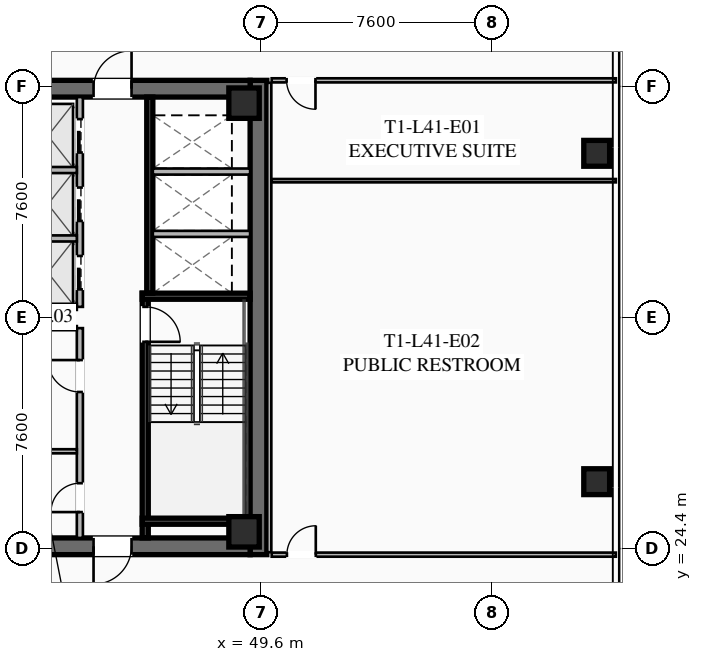
"""IFC4 building model, lengths in metres.
Left out: names, types, materials, properties, quantities, classifications, styles, units other than length and angle.
Written with IfcOpenShell. Run it as: python <this file> out.ifc"""

import sys

from ifc_helpers import new_model, si_unit, direction, frame, frame_2d, origin, origin_2d, place, context, subcontext, project, spatial, rectangle, hollow_rectangle, extrude, element, fill, save


model = new_model("IFC4")
c1 = context("Model", 3, precision=1e-05, world=origin(), true_north=direction((0.0, 1.0)))
c2 = subcontext(c1, "Body", "Model", "MODEL_VIEW")
j1 = project(units=[si_unit("LENGTHUNIT", "METRE"), si_unit("PLANEANGLEUNIT", "RADIAN")], contexts=[c1])
p1 = place(None, origin())
s1 = spatial("IfcSite", under=j1, at=p1, CompositionType="ELEMENT")
p2 = place(p1, origin())
s2 = spatial("IfcBuilding", under=s1, at=p2, CompositionType="ELEMENT")
p3 = place(p2, frame((0.0, 0.0, 153.45)))
s3 = spatial("IfcBuildingStorey", under=s2, at=p3, CompositionType="ELEMENT", Elevation=153.45)
p4 = place(p3, frame((49.525, 39.8, 0.0), z_axis=(0.0, 0.0, 1.0), x_axis=(0.0, -1.0, 0.0)))
e1 = element("IfcWall", 1, at=p4, inside=s3, PredefinedType="SHEAR", context=c2, shape_type="SweptSolid", body=[
    extrude(rectangle(XDim=15.6, YDim=0.55, at=frame_2d((7.8, 0.0))), origin(), (0.0, 0.0, 1.0), 3.55),
])
p5 = place(p3, frame((49.25, 24.475, 0.0), z_axis=(0.0, 0.0, 1.0), x_axis=(-1.0, 0.0, 0.0)))
e2 = element("IfcWall", 2, at=p5, inside=s3, PredefinedType="SHEAR", context=c2, shape_type="SweptSolid", body=[
    extrude(rectangle(XDim=14.5, YDim=0.55, at=frame_2d((7.25, 0.0))), origin(), (0.0, 0.0, 1.0), 3.55),
])
p6 = place(p5, frame((8.95, 0.0, 0.0)))
e3 = element("IfcOpeningElement", 3, at=p6, cuts=e2, PredefinedType="OPENING", context=c2, shape_type="SweptSolid", body=[
    extrude(rectangle(XDim=1.25, YDim=2.25, at=frame_2d((0.625, 1.125))), frame((0.0, 0.285, 0.0), z_axis=(0.0, -1.0, 0.0), x_axis=(1.0, 0.0, 0.0)), (0.0, 0.0, 1.0), 0.57),
])
p7 = place(p5, frame((3.9, 0.0, 0.0)))
e4 = element("IfcOpeningElement", 4, at=p7, cuts=e2, PredefinedType="OPENING", context=c2, shape_type="SweptSolid", body=[
    extrude(rectangle(XDim=1.25, YDim=2.25, at=frame_2d((0.625, 1.125))), frame((0.0, 0.285, 0.0), z_axis=(0.0, -1.0, 0.0), x_axis=(1.0, 0.0, 0.0)), (0.0, 0.0, 1.0), 0.57),
])
p8 = place(p3, frame((34.75, 39.525, 0.0), z_axis=(0.0, 0.0, 1.0), x_axis=(1.0, 0.0, 0.0)))
e5 = element("IfcWall", 5, at=p8, inside=s3, PredefinedType="SHEAR", context=c2, shape_type="SweptSolid", body=[
    extrude(rectangle(XDim=14.5, YDim=0.55, at=frame_2d((7.25, 0.0))), origin(), (0.0, 0.0, 1.0), 3.55),
])
p9 = place(p8, frame((4.3, 0.0, 0.0)))
e6 = element("IfcOpeningElement", 6, at=p9, cuts=e5, PredefinedType="OPENING", context=c2, shape_type="SweptSolid", body=[
    extrude(rectangle(XDim=1.25, YDim=2.25, at=frame_2d((0.625, 1.125))), frame((0.0, 0.285, 0.0), z_axis=(0.0, -1.0, 0.0), x_axis=(1.0, 0.0, 0.0)), (0.0, 0.0, 1.0), 0.57),
])
p10 = place(p8, frame((9.35, 0.0, 0.0)))
e7 = element("IfcOpeningElement", 7, at=p10, cuts=e5, PredefinedType="OPENING", context=c2, shape_type="SweptSolid", body=[
    extrude(rectangle(XDim=1.25, YDim=2.25, at=frame_2d((0.625, 1.125))), frame((0.0, 0.285, 0.0), z_axis=(0.0, -1.0, 0.0), x_axis=(1.0, 0.0, 0.0)), (0.0, 0.0, 1.0), 0.57),
])
for number, where, z_axis, x_axis in (
    (8, (49.05, 24.95, 0.0), (0.0, 0.0, 1.0), (1.0, 0.0, 0.0)),
    (9, (49.05, 39.05, 0.0), (0.0, 0.0, 1.0), (1.0, 0.0, 0.0)),
):
    element("IfcColumn", number, at=place(p3, frame(where, z_axis=z_axis, x_axis=x_axis)), inside=s3, PredefinedType="COLUMN", context=c2, shape_type="SweptSolid", body=[
        extrude(hollow_rectangle(XDim=1.0, YDim=1.0, WallThickness=0.04, at=origin_2d()), origin(), (0.0, 0.0, 1.0), 3.37),
    ])
for number, where, z_axis, x_axis in (
    (10, (60.65, 26.6, 0.0), (0.0, 0.0, 1.0), (1.0, 0.0, 0.0)),
    (11, (60.65, 37.4, 0.0), (0.0, 0.0, 1.0), (1.0, 0.0, 0.0)),
):
    element("IfcColumn", number, at=place(p3, frame(where, z_axis=z_axis, x_axis=x_axis)), inside=s3, PredefinedType="COLUMN", context=c2, shape_type="SweptSolid", body=[
        extrude(hollow_rectangle(XDim=0.85, YDim=0.85, WallThickness=0.035, at=origin_2d()), origin(), (0.0, 0.0, 1.0), 3.37),
    ])
p11 = place(p3, frame((45.8, 32.8, 0.0), z_axis=(0.0, 0.0, 1.0), x_axis=(0.0, -1.0, 0.0)))
e12 = element("IfcWall", 12, at=p11, inside=s3, PredefinedType="SHEAR", context=c2, shape_type="SweptSolid", body=[
    extrude(rectangle(XDim=8.05, YDim=0.2, at=frame_2d((4.025, 0.0))), origin(), (0.0, 0.0, 1.0), 3.37),
])
p12 = place(p11, frame((0.45, 0.0, 0.0)))
e13 = element("IfcOpeningElement", 13, at=p12, cuts=e12, PredefinedType="OPENING", context=c2, shape_type="SweptSolid", body=[
    extrude(rectangle(XDim=1.15, YDim=2.2, at=frame_2d((0.575, 1.1))), frame((0.0, 0.11, 0.0), z_axis=(0.0, -1.0, 0.0), x_axis=(1.0, 0.0, 0.0)), (0.0, 0.0, 1.0), 0.22),
])
for number, where, z_axis, x_axis in (
    (14, (45.7, 32.7, 0.0), (0.0, 0.0, 1.0), (1.0, 0.0, 0.0)),
    (15, (45.7, 25.3, 0.0), (0.0, 0.0, 1.0), (1.0, 0.0, 0.0)),
):
    element("IfcWall", number, at=place(p3, frame(where, z_axis=z_axis, x_axis=x_axis)), inside=s3, PredefinedType="SHEAR", context=c2, shape_type="SweptSolid", body=[
        extrude(rectangle(XDim=3.55, YDim=0.2, at=frame_2d((1.775, 0.0))), origin(), (0.0, 0.0, 1.0), 3.37),
    ])
p13 = place(p3, frame((45.95, 39.25, 0.0), z_axis=(0.0, 0.0, 1.0), x_axis=(0.0, -1.0, 0.0)))
e16 = element("IfcWall", 16, at=p13, inside=s3, PredefinedType="SHEAR", context=c2, shape_type="SweptSolid", body=[
    extrude(rectangle(XDim=6.45, YDim=0.2, at=frame_2d((3.225, 0.0))), origin(), (0.0, 0.0, 1.0), 3.37),
])
for number, where, z_axis, x_axis in (
    (17, (46.05, 34.75, 0.0), (0.0, 0.0, 1.0), (1.0, 0.0, 0.0)),
    (18, (46.05, 36.8, 0.0), (0.0, 0.0, 1.0), (1.0, 0.0, 0.0)),
):
    element("IfcWall", number, at=place(p3, frame(where, z_axis=z_axis, x_axis=x_axis)), inside=s3, PredefinedType="SOLIDWALL", context=c2, shape_type="SweptSolid", body=[
        extrude(rectangle(XDim=3.2, YDim=0.2, at=frame_2d((1.6, 0.0))), origin(), (0.0, 0.0, 1.0), 3.37),
    ])
p14 = place(p3, frame((43.65, 24.75, 0.0), z_axis=(0.0, 0.0, 1.0), x_axis=(0.0, 1.0, 0.0)))
e19 = element("IfcWall", 19, at=p14, inside=s3, PredefinedType="SOLIDWALL", context=c2, shape_type="SweptSolid", body=[
    extrude(rectangle(XDim=6.9, YDim=0.2, at=frame_2d((3.45, 0.0))), origin(), (0.0, 0.0, 1.0), 2.513),
])
p15 = place(p14, frame((0.85, 0.0, 0.0)))
e20 = element("IfcOpeningElement", 20, at=p15, cuts=e19, PredefinedType="OPENING", context=c2, shape_type="SweptSolid", body=[
    extrude(rectangle(XDim=0.95, YDim=2.05, at=frame_2d((0.475, 1.025))), frame((0.0, 0.11, 0.0), z_axis=(0.0, -1.0, 0.0), x_axis=(1.0, 0.0, 0.0)), (0.0, 0.0, 1.0), 0.22),
])
p16 = place(p14, frame((4.8, 0.0, 0.0)))
e21 = element("IfcOpeningElement", 21, at=p16, cuts=e19, PredefinedType="OPENING", context=c2, shape_type="SweptSolid", body=[
    extrude(rectangle(XDim=1.05, YDim=2.2, at=frame_2d((0.525, 1.1))), frame((0.0, 0.11, 0.0), z_axis=(0.0, -1.0, 0.0), x_axis=(1.0, 0.0, 0.0)), (0.0, 0.0, 1.0), 0.22),
])
for number, where, z_axis, x_axis in (
    (22, (41.67, 31.65, 0.0), (0.0, 0.0, 1.0), (1.0, 0.0, 0.0)),
    (23, (41.67, 27.6, 0.0), (0.0, 0.0, 1.0), (1.0, 0.0, 0.0)),
):
    element("IfcWall", number, at=place(p3, frame(where, z_axis=z_axis, x_axis=x_axis)), inside=s3, PredefinedType="PARTITIONING", context=c2, shape_type="SweptSolid", body=[
        extrude(rectangle(XDim=1.88, YDim=0.135, at=frame_2d((0.94, 0.0))), origin(), (0.0, 0.0, 1.0), 2.513),
    ])
p17 = place(p3, frame((43.65, 32.35, 0.0), z_axis=(0.0, 0.0, 1.0), x_axis=(0.0, 1.0, 0.0)))
e24 = element("IfcWall", 24, at=p17, inside=s3, PredefinedType="SOLIDWALL", context=c2, shape_type="SweptSolid", body=[
    extrude(rectangle(XDim=6.9, YDim=0.2, at=frame_2d((3.45, 0.0))), origin(), (0.0, 0.0, 1.0), 3.37),
])
p18 = place(p17, frame((0.575, 0.0, 0.0)))
e25 = element("IfcOpeningElement", 25, at=p18, cuts=e24, PredefinedType="OPENING", context=c2, shape_type="SweptSolid", body=[
    extrude(rectangle(XDim=1.1, YDim=2.2, at=frame_2d((0.55, 1.1))), frame((0.0, 0.11, 0.0), z_axis=(0.0, -1.0, 0.0), x_axis=(1.0, 0.0, 0.0)), (0.0, 0.0, 1.0), 0.22),
])
p19 = place(p17, frame((2.825, 0.0, 0.0)))
e26 = element("IfcOpeningElement", 26, at=p19, cuts=e24, PredefinedType="OPENING", context=c2, shape_type="SweptSolid", body=[
    extrude(rectangle(XDim=1.1, YDim=2.2, at=frame_2d((0.55, 1.1))), frame((0.0, 0.11, 0.0), z_axis=(0.0, -1.0, 0.0), x_axis=(1.0, 0.0, 0.0)), (0.0, 0.0, 1.0), 0.22),
])
p20 = place(p17, frame((5.075, 0.0, 0.0)))
e27 = element("IfcOpeningElement", 27, at=p20, cuts=e24, PredefinedType="OPENING", context=c2, shape_type="SweptSolid", body=[
    extrude(rectangle(XDim=1.1, YDim=2.2, at=frame_2d((0.55, 1.1))), frame((0.0, 0.11, 0.0), z_axis=(0.0, -1.0, 0.0), x_axis=(1.0, 0.0, 0.0)), (0.0, 0.0, 1.0), 0.22),
])
for number, where, z_axis, x_axis in (
    (28, (41.67, 32.35, 0.0), (0.0, 0.0, 1.0), (1.0, 0.0, 0.0)),
    (29, (41.67, 34.6, 0.0), (0.0, 0.0, 1.0), (1.0, 0.0, 0.0)),
    (30, (41.67, 36.85, 0.0), (0.0, 0.0, 1.0), (1.0, 0.0, 0.0)),
):
    element("IfcWall", number, at=place(p3, frame(where, z_axis=z_axis, x_axis=x_axis)), inside=s3, PredefinedType="SOLIDWALL", context=c2, shape_type="SweptSolid", body=[
        extrude(rectangle(XDim=1.88, YDim=0.2, at=frame_2d((0.94, 0.0))), origin(), (0.0, 0.0, 1.0), 3.37),
    ])
p21 = place(p3, frame((49.88, 39.72, 0.0), z_axis=(0.0, 0.0, 1.0), x_axis=(0.0, -1.0, 0.0)))
e31 = element("IfcWall", 31, at=p21, inside=s3, PredefinedType="PARTITIONING", context=c2, shape_type="SweptSolid", body=[
    extrude(rectangle(XDim=15.44, YDim=0.135, at=frame_2d((7.72, 0.0))), origin(), (0.0, 0.0, 1.0), 2.513),
])
p22 = place(p3, frame((61.28, 39.8, 0.0), z_axis=(0.0, 0.0, 1.0), x_axis=(-1.0, 0.0, 0.0)))
e32 = element("IfcWall", 32, at=p22, inside=s3, PredefinedType="PARTITIONING", context=c2, shape_type="SweptSolid", body=[
    extrude(rectangle(XDim=11.32, YDim=0.135, at=frame_2d((5.66, 0.0))), origin(), (0.0, 0.0, 1.0), 2.513),
])
p23 = place(p22, frame((9.88, 0.0, 0.0)))
e33 = element("IfcOpeningElement", 33, at=p23, cuts=e32, PredefinedType="OPENING", context=c2, shape_type="SweptSolid", body=[
    extrude(rectangle(XDim=0.95, YDim=2.05, at=frame_2d((0.475, 1.025))), frame((0.0, 0.077, 0.0), z_axis=(0.0, -1.0, 0.0), x_axis=(1.0, 0.0, 0.0)), (0.0, 0.0, 1.0), 0.155),
])
p24 = place(p3, frame((49.96, 24.2, 0.0), z_axis=(0.0, 0.0, 1.0), x_axis=(1.0, 0.0, 0.0)))
e34 = element("IfcWall", 34, at=p24, inside=s3, PredefinedType="PARTITIONING", context=c2, shape_type="SweptSolid", body=[
    extrude(rectangle(XDim=11.32, YDim=0.135, at=frame_2d((5.66, 0.0))), origin(), (0.0, 0.0, 1.0), 2.513),
])
p25 = place(p24, frame((0.5, 0.0, 0.0)))
e35 = element("IfcOpeningElement", 35, at=p25, cuts=e34, PredefinedType="OPENING", context=c2, shape_type="SweptSolid", body=[
    extrude(rectangle(XDim=0.95, YDim=2.05, at=frame_2d((0.475, 1.025))), frame((0.0, 0.077, 0.0), z_axis=(0.0, -1.0, 0.0), x_axis=(1.0, 0.0, 0.0)), (0.0, 0.0, 1.0), 0.155),
])
p26 = place(p3, frame((49.96, 36.5, 0.0), z_axis=(0.0, 0.0, 1.0), x_axis=(1.0, 0.0, 0.0)))
e36 = element("IfcWall", 36, at=p26, inside=s3, PredefinedType="PARTITIONING", context=c2, shape_type="SweptSolid", body=[
    extrude(rectangle(XDim=11.32, YDim=0.11, at=frame_2d((5.66, 0.0))), origin(), (0.0, 0.0, 1.0), 2.513),
])
p27 = place(p10, origin())
e37 = element("IfcDoor", 37, at=p27, inside=s3, OperationType="SINGLE_SWING_RIGHT", PredefinedType="DOOR", context=c2, shape_type="SweptSolid", body=[
    extrude(rectangle(XDim=1.25, YDim=2.25, at=frame_2d((0.625, 1.125))), frame((0.0, 0.025, 0.0), z_axis=(0.0, -1.0, 0.0), x_axis=(1.0, 0.0, 0.0)), (0.0, 0.0, 1.0), 0.05),
])
fill(e7, e37)
p28 = place(p7, origin())
e38 = element("IfcDoor", 38, at=p28, inside=s3, OperationType="SINGLE_SWING_RIGHT", PredefinedType="DOOR", context=c2, shape_type="SweptSolid", body=[
    extrude(rectangle(XDim=1.25, YDim=2.25, at=frame_2d((0.625, 1.125))), frame((0.0, 0.025, 0.0), z_axis=(0.0, -1.0, 0.0), x_axis=(1.0, 0.0, 0.0)), (0.0, 0.0, 1.0), 0.05),
])
fill(e4, e38)
p29 = place(p12, origin())
e39 = element("IfcDoor", 39, at=p29, inside=s3, OperationType="SINGLE_SWING_RIGHT", PredefinedType="DOOR", context=c2, shape_type="SweptSolid", body=[
    extrude(rectangle(XDim=1.15, YDim=2.2, at=frame_2d((0.575, 1.1))), frame((0.0, 0.025, 0.0), z_axis=(0.0, -1.0, 0.0), x_axis=(1.0, 0.0, 0.0)), (0.0, 0.0, 1.0), 0.05),
])
fill(e13, e39)
p30 = place(p15, origin())
e40 = element("IfcDoor", 40, at=p30, inside=s3, OperationType="SINGLE_SWING_LEFT", PredefinedType="DOOR", context=c2, shape_type="SweptSolid", body=[
    extrude(rectangle(XDim=0.95, YDim=2.05, at=frame_2d((0.475, 1.025))), frame((0.0, 0.025, 0.0), z_axis=(0.0, -1.0, 0.0), x_axis=(1.0, 0.0, 0.0)), (0.0, 0.0, 1.0), 0.05),
])
fill(e20, e40)
p31 = place(p16, origin())
e41 = element("IfcDoor", 41, at=p31, inside=s3, OperationType="SINGLE_SWING_RIGHT", PredefinedType="DOOR", context=c2, shape_type="SweptSolid", body=[
    extrude(rectangle(XDim=1.05, YDim=2.2, at=frame_2d((0.525, 1.1))), frame((0.0, 0.025, 0.0), z_axis=(0.0, -1.0, 0.0), x_axis=(1.0, 0.0, 0.0)), (0.0, 0.0, 1.0), 0.05),
])
fill(e21, e41)
p32 = place(p23, origin())
e42 = element("IfcDoor", 42, at=p32, inside=s3, OperationType="SINGLE_SWING_LEFT", PredefinedType="DOOR", context=c2, shape_type="SweptSolid", body=[
    extrude(rectangle(XDim=0.95, YDim=2.05, at=frame_2d((0.475, 1.025))), frame((0.0, 0.025, 0.0), z_axis=(0.0, -1.0, 0.0), x_axis=(1.0, 0.0, 0.0)), (0.0, 0.0, 1.0), 0.05),
])
fill(e33, e42)
p33 = place(p25, origin())
e43 = element("IfcDoor", 43, at=p33, inside=s3, OperationType="SINGLE_SWING_RIGHT", PredefinedType="DOOR", context=c2, shape_type="SweptSolid", body=[
    extrude(rectangle(XDim=0.95, YDim=2.05, at=frame_2d((0.475, 1.025))), frame((0.0, 0.025, 0.0), z_axis=(0.0, -1.0, 0.0), x_axis=(1.0, 0.0, 0.0)), (0.0, 0.0, 1.0), 0.05),
])
fill(e35, e43)
p34 = place(p18, origin())
e44 = element("IfcDoor", 44, at=p34, inside=s3, OperationType="SLIDING_TO_LEFT", PredefinedType="DOOR", context=c2, shape_type="SweptSolid", body=[
    extrude(rectangle(XDim=1.1, YDim=2.2, at=frame_2d((0.55, 1.1))), frame((0.0, 0.025, 0.0), z_axis=(0.0, -1.0, 0.0), x_axis=(1.0, 0.0, 0.0)), (0.0, 0.0, 1.0), 0.05),
])
fill(e25, e44)
p35 = place(p19, origin())
e45 = element("IfcDoor", 45, at=p35, inside=s3, OperationType="SLIDING_TO_LEFT", PredefinedType="DOOR", context=c2, shape_type="SweptSolid", body=[
    extrude(rectangle(XDim=1.1, YDim=2.2, at=frame_2d((0.55, 1.1))), frame((0.0, 0.025, 0.0), z_axis=(0.0, -1.0, 0.0), x_axis=(1.0, 0.0, 0.0)), (0.0, 0.0, 1.0), 0.05),
])
fill(e26, e45)
p36 = place(p20, origin())
e46 = element("IfcDoor", 46, at=p36, inside=s3, OperationType="SLIDING_TO_LEFT", PredefinedType="DOOR", context=c2, shape_type="SweptSolid", body=[
    extrude(rectangle(XDim=1.1, YDim=2.2, at=frame_2d((0.55, 1.1))), frame((0.0, 0.025, 0.0), z_axis=(0.0, -1.0, 0.0), x_axis=(1.0, 0.0, 0.0)), (0.0, 0.0, 1.0), 0.05),
])
fill(e27, e46)
save(model, sys.argv[1])
